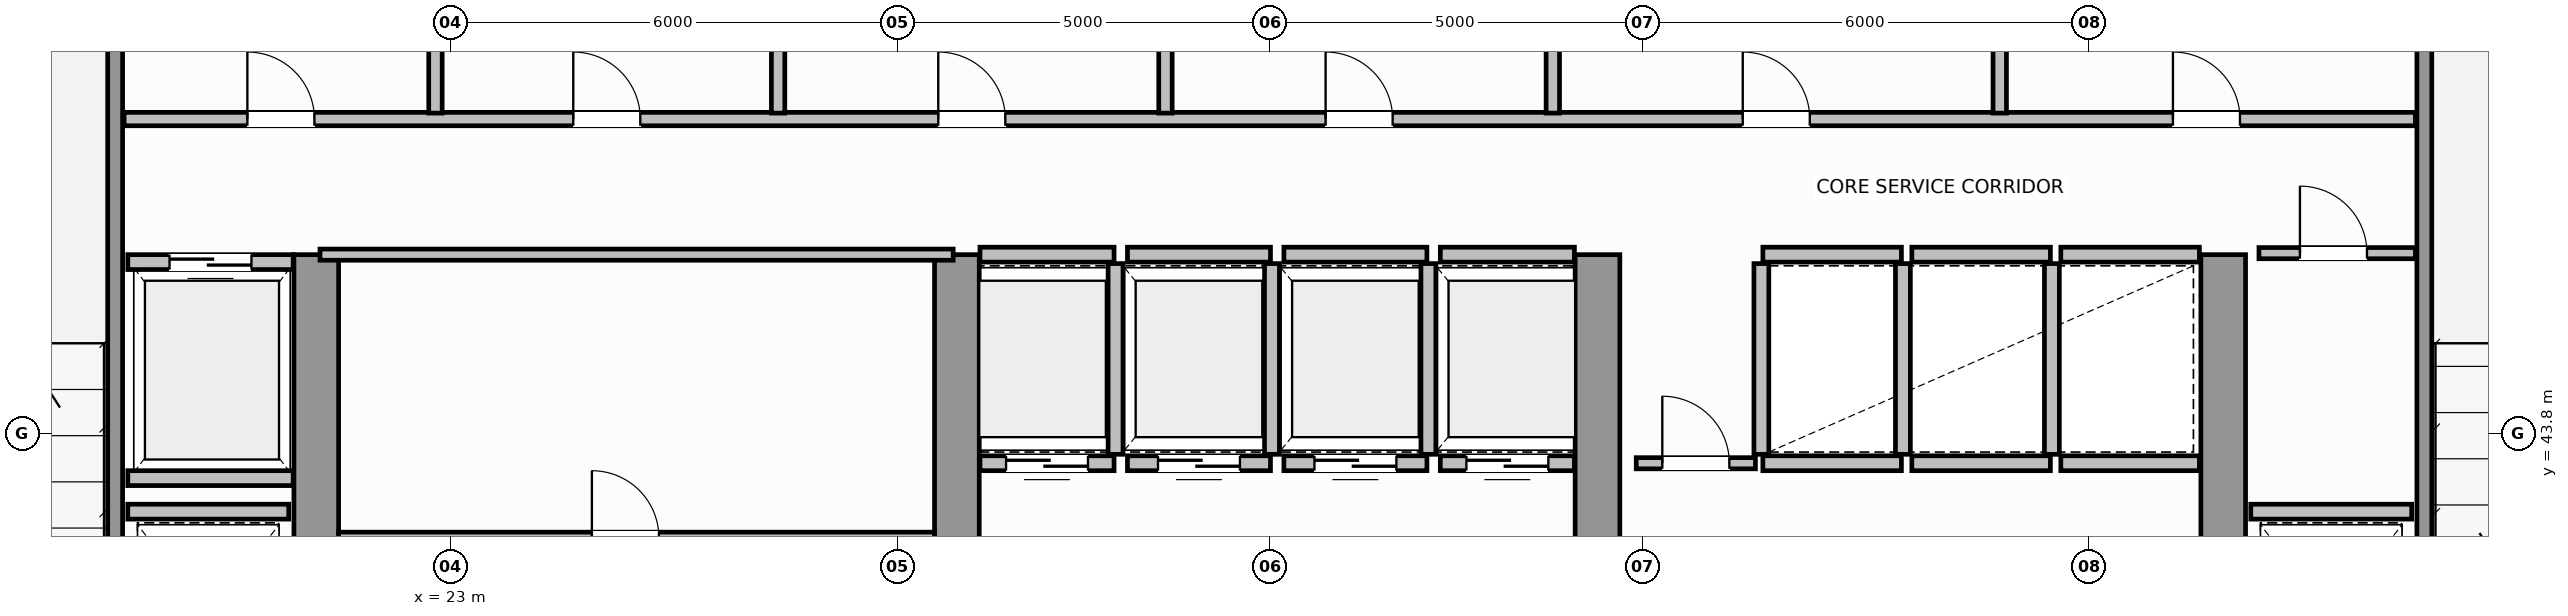
"""IFC4 building model, lengths in metres.
Left out: names, types, materials, properties, quantities, classifications, styles, units other than length and angle.
Written with IfcOpenShell. Run it as: python <this file> out.ifc"""

import sys

from ifc_helpers import new_model, si_unit, direction, frame, frame_2d, origin, place, context, subcontext, project, spatial, rectangle, extrude, source, transform, mapped, element, fill, save


model = new_model("IFC4")
c1 = context("Model", 3, precision=1e-05, world=origin(), true_north=direction((0.0, 1.0)))
c2 = subcontext(c1, "Body", "Model", "MODEL_VIEW")
j1 = project(units=[si_unit("LENGTHUNIT", "METRE"), si_unit("PLANEANGLEUNIT", "RADIAN")], contexts=[c1])
p1 = place(None, origin())
s1 = spatial("IfcSite", under=j1, at=p1, CompositionType="ELEMENT")
p2 = place(p1, origin())
s2 = spatial("IfcBuilding", under=s1, at=p2, CompositionType="ELEMENT")
p3 = place(p2, frame((0.0, 0.0, 188.0)))
s3 = spatial("IfcBuildingStorey", under=s2, at=p3, CompositionType="ELEMENT", Elevation=188.0)
for number, where, z_axis, x_axis in (
    (1, (21.2, 36.82, 0.0), (0.0, 0.0, 1.0), (0.0, 1.0, 0.0)),
    (2, (29.8, 36.82, 0.0), (0.0, 0.0, 1.0), (0.0, 1.0, 0.0)),
    (3, (38.4, 36.82, 0.0), (0.0, 0.0, 1.0), (0.0, 1.0, 0.0)),
    (4, (46.8, 36.82, 0.0), (0.0, 0.0, 1.0), (0.0, 1.0, 0.0)),
):
    element("IfcWall", number, at=place(p3, frame(where, z_axis=z_axis, x_axis=x_axis)), inside=s3, PredefinedType="SHEAR", context=c2, shape_type="SweptSolid", body=[
        extrude(rectangle(XDim=9.38, YDim=0.6, at=frame_2d((4.69, 0.0))), origin(), (0.0, 0.0, 1.0), 3.8),
    ])
for number, where, z_axis, x_axis in (
    (5, (18.5, 39.96, 0.0), (0.0, 0.0, 1.0), (0.0, 1.0, 0.0)),
    (6, (49.5, 39.96, 0.0), (0.0, 0.0, 1.0), (0.0, 1.0, 0.0)),
):
    element("IfcWall", number, at=place(p3, frame(where, z_axis=z_axis, x_axis=x_axis)), inside=s3, PredefinedType="SOLIDWALL", context=c2, shape_type="SweptSolid", body=[
        extrude(rectangle(XDim=9.93, YDim=0.2, at=frame_2d((4.965, 0.0))), origin(), (0.0, 0.0, 1.0), 3.8),
    ])
p4 = place(p3, frame((30.11, 43.4, 0.0), z_axis=(0.0, 0.0, 1.0), x_axis=(1.0, 0.0, 0.0)))
e7 = element("IfcWall", 7, at=p4, inside=s3, PredefinedType="SOLIDWALL", context=c2, shape_type="SweptSolid", body=[
    extrude(rectangle(XDim=1.8, YDim=0.2, at=frame_2d((0.9, 0.0))), origin(), (0.0, 0.0, 1.0), 3.58),
])
p5 = place(p4, frame((0.35, 0.0, 0.0)))
e8 = element("IfcOpeningElement", 8, at=p5, cuts=e7, PredefinedType="OPENING", context=c2, shape_type="SweptSolid", body=[
    extrude(rectangle(XDim=1.1, YDim=2.15, at=frame_2d((0.55, 1.075))), frame((0.0, 0.11, 0.0), z_axis=(0.0, -1.0, 0.0), x_axis=(1.0, 0.0, 0.0)), (0.0, 0.0, 1.0), 0.22),
])
p6 = place(p3, frame((30.11, 46.2, 0.0), z_axis=(0.0, 0.0, 1.0), x_axis=(1.0, 0.0, 0.0)))
e9 = element("IfcWall", 9, at=p6, inside=s3, PredefinedType="SOLIDWALL", context=c2, shape_type="SweptSolid", body=[
    extrude(rectangle(XDim=1.8, YDim=0.2, at=frame_2d((0.9, 0.0))), origin(), (0.0, 0.0, 1.0), 3.58),
])
p7 = place(p3, frame((31.93, 43.52, 0.0), z_axis=(0.0, 0.0, 1.0), x_axis=(0.0, 1.0, 0.0)))
e10 = element("IfcWall", 10, at=p7, inside=s3, PredefinedType="SOLIDWALL", context=c2, shape_type="SweptSolid", body=[
    extrude(rectangle(XDim=2.56, YDim=0.2, at=frame_2d((1.28, 0.0))), origin(), (0.0, 0.0, 1.0), 3.58),
])
p8 = place(p3, frame((32.09, 43.4, 0.0), z_axis=(0.0, 0.0, 1.0), x_axis=(1.0, 0.0, 0.0)))
e11 = element("IfcWall", 11, at=p8, inside=s3, PredefinedType="SOLIDWALL", context=c2, shape_type="SweptSolid", body=[
    extrude(rectangle(XDim=1.92, YDim=0.2, at=frame_2d((0.96, 0.0))), origin(), (0.0, 0.0, 1.0), 3.58),
])
p9 = place(p8, frame((0.41, 0.0, 0.0)))
e12 = element("IfcOpeningElement", 12, at=p9, cuts=e11, PredefinedType="OPENING", context=c2, shape_type="SweptSolid", body=[
    extrude(rectangle(XDim=1.1, YDim=2.15, at=frame_2d((0.55, 1.075))), frame((0.0, 0.11, 0.0), z_axis=(0.0, -1.0, 0.0), x_axis=(1.0, 0.0, 0.0)), (0.0, 0.0, 1.0), 0.22),
])
p10 = place(p3, frame((32.09, 46.2, 0.0), z_axis=(0.0, 0.0, 1.0), x_axis=(1.0, 0.0, 0.0)))
e13 = element("IfcWall", 13, at=p10, inside=s3, PredefinedType="SOLIDWALL", context=c2, shape_type="SweptSolid", body=[
    extrude(rectangle(XDim=1.92, YDim=0.2, at=frame_2d((0.96, 0.0))), origin(), (0.0, 0.0, 1.0), 3.58),
])
p11 = place(p3, frame((34.03, 43.52, 0.0), z_axis=(0.0, 0.0, 1.0), x_axis=(0.0, 1.0, 0.0)))
e14 = element("IfcWall", 14, at=p11, inside=s3, PredefinedType="SOLIDWALL", context=c2, shape_type="SweptSolid", body=[
    extrude(rectangle(XDim=2.56, YDim=0.2, at=frame_2d((1.28, 0.0))), origin(), (0.0, 0.0, 1.0), 3.58),
])
p12 = place(p3, frame((34.19, 43.4, 0.0), z_axis=(0.0, 0.0, 1.0), x_axis=(1.0, 0.0, 0.0)))
e15 = element("IfcWall", 15, at=p12, inside=s3, PredefinedType="SOLIDWALL", context=c2, shape_type="SweptSolid", body=[
    extrude(rectangle(XDim=1.92, YDim=0.2, at=frame_2d((0.96, 0.0))), origin(), (0.0, 0.0, 1.0), 3.58),
])
p13 = place(p12, frame((0.41, 0.0, 0.0)))
e16 = element("IfcOpeningElement", 16, at=p13, cuts=e15, PredefinedType="OPENING", context=c2, shape_type="SweptSolid", body=[
    extrude(rectangle(XDim=1.1, YDim=2.15, at=frame_2d((0.55, 1.075))), frame((0.0, 0.11, 0.0), z_axis=(0.0, -1.0, 0.0), x_axis=(1.0, 0.0, 0.0)), (0.0, 0.0, 1.0), 0.22),
])
p14 = place(p3, frame((34.19, 46.2, 0.0), z_axis=(0.0, 0.0, 1.0), x_axis=(1.0, 0.0, 0.0)))
e17 = element("IfcWall", 17, at=p14, inside=s3, PredefinedType="SOLIDWALL", context=c2, shape_type="SweptSolid", body=[
    extrude(rectangle(XDim=1.92, YDim=0.2, at=frame_2d((0.96, 0.0))), origin(), (0.0, 0.0, 1.0), 3.58),
])
p15 = place(p3, frame((36.13, 43.52, 0.0), z_axis=(0.0, 0.0, 1.0), x_axis=(0.0, 1.0, 0.0)))
e18 = element("IfcWall", 18, at=p15, inside=s3, PredefinedType="SOLIDWALL", context=c2, shape_type="SweptSolid", body=[
    extrude(rectangle(XDim=2.56, YDim=0.2, at=frame_2d((1.28, 0.0))), origin(), (0.0, 0.0, 1.0), 3.58),
])
p16 = place(p3, frame((36.29, 43.4, 0.0), z_axis=(0.0, 0.0, 1.0), x_axis=(1.0, 0.0, 0.0)))
e19 = element("IfcWall", 19, at=p16, inside=s3, PredefinedType="SOLIDWALL", context=c2, shape_type="SweptSolid", body=[
    extrude(rectangle(XDim=1.8, YDim=0.2, at=frame_2d((0.9, 0.0))), origin(), (0.0, 0.0, 1.0), 3.58),
])
p17 = place(p16, frame((0.35, 0.0, 0.0)))
e20 = element("IfcOpeningElement", 20, at=p17, cuts=e19, PredefinedType="OPENING", context=c2, shape_type="SweptSolid", body=[
    extrude(rectangle(XDim=1.1, YDim=2.15, at=frame_2d((0.55, 1.075))), frame((0.0, 0.11, 0.0), z_axis=(0.0, -1.0, 0.0), x_axis=(1.0, 0.0, 0.0)), (0.0, 0.0, 1.0), 0.22),
])
p18 = place(p3, frame((36.29, 46.2, 0.0), z_axis=(0.0, 0.0, 1.0), x_axis=(1.0, 0.0, 0.0)))
e21 = element("IfcWall", 21, at=p18, inside=s3, PredefinedType="SOLIDWALL", context=c2, shape_type="SweptSolid", body=[
    extrude(rectangle(XDim=1.8, YDim=0.2, at=frame_2d((0.9, 0.0))), origin(), (0.0, 0.0, 1.0), 3.58),
])
for number, where, z_axis, x_axis in (
    (22, (40.62, 43.4, 0.0), (0.0, 0.0, 1.0), (1.0, 0.0, 0.0)),
    (23, (40.62, 46.2, 0.0), (0.0, 0.0, 1.0), (1.0, 0.0, 0.0)),
):
    element("IfcWall", number, at=place(p3, frame(where, z_axis=z_axis, x_axis=x_axis)), inside=s3, PredefinedType="SOLIDWALL", context=c2, shape_type="SweptSolid", body=[
        extrude(rectangle(XDim=1.86, YDim=0.2, at=frame_2d((0.93, 0.0))), origin(), (0.0, 0.0, 1.0), 3.58),
    ])
for number, where, z_axis, x_axis in (
    (24, (40.6, 43.52, 0.0), (0.0, 0.0, 1.0), (0.0, 1.0, 0.0)),
    (25, (42.5, 43.52, 0.0), (0.0, 0.0, 1.0), (0.0, 1.0, 0.0)),
):
    element("IfcWall", number, at=place(p3, frame(where, z_axis=z_axis, x_axis=x_axis)), inside=s3, PredefinedType="SOLIDWALL", context=c2, shape_type="SweptSolid", body=[
        extrude(rectangle(XDim=2.56, YDim=0.2, at=frame_2d((1.28, 0.0))), origin(), (0.0, 0.0, 1.0), 3.58),
    ])
for number, where, z_axis, x_axis in (
    (26, (42.62, 43.4, 0.0), (0.0, 0.0, 1.0), (1.0, 0.0, 0.0)),
    (27, (42.62, 46.2, 0.0), (0.0, 0.0, 1.0), (1.0, 0.0, 0.0)),
):
    element("IfcWall", number, at=place(p3, frame(where, z_axis=z_axis, x_axis=x_axis)), inside=s3, PredefinedType="SOLIDWALL", context=c2, shape_type="SweptSolid", body=[
        extrude(rectangle(XDim=1.86, YDim=0.2, at=frame_2d((0.93, 0.0))), origin(), (0.0, 0.0, 1.0), 3.58),
    ])
p19 = place(p3, frame((44.5, 43.52, 0.0), z_axis=(0.0, 0.0, 1.0), x_axis=(0.0, 1.0, 0.0)))
e28 = element("IfcWall", 28, at=p19, inside=s3, PredefinedType="SOLIDWALL", context=c2, shape_type="SweptSolid", body=[
    extrude(rectangle(XDim=2.56, YDim=0.2, at=frame_2d((1.28, 0.0))), origin(), (0.0, 0.0, 1.0), 3.58),
])
for number, where, z_axis, x_axis in (
    (29, (44.62, 43.4, 0.0), (0.0, 0.0, 1.0), (1.0, 0.0, 0.0)),
    (30, (44.62, 46.2, 0.0), (0.0, 0.0, 1.0), (1.0, 0.0, 0.0)),
):
    element("IfcWall", number, at=place(p3, frame(where, z_axis=z_axis, x_axis=x_axis)), inside=s3, PredefinedType="SOLIDWALL", context=c2, shape_type="SweptSolid", body=[
        extrude(rectangle(XDim=1.86, YDim=0.2, at=frame_2d((0.93, 0.0))), origin(), (0.0, 0.0, 1.0), 3.58),
    ])
p20 = place(p3, frame((18.67, 46.1, 0.0), z_axis=(0.0, 0.0, 1.0), x_axis=(1.0, 0.0, 0.0)))
e31 = element("IfcWall", 31, at=p20, inside=s3, PredefinedType="SOLIDWALL", context=c2, shape_type="SweptSolid", body=[
    extrude(rectangle(XDim=2.22, YDim=0.2, at=frame_2d((1.11, 0.0))), origin(), (0.0, 0.0, 1.0), 3.58),
])
p21 = place(p20, frame((0.56, 0.0, 0.0)))
e32 = element("IfcOpeningElement", 32, at=p21, cuts=e31, PredefinedType="OPENING", context=c2, shape_type="SweptSolid", body=[
    extrude(rectangle(XDim=1.1, YDim=2.15, at=frame_2d((0.55, 1.075))), frame((0.0, 0.11, 0.0), z_axis=(0.0, -1.0, 0.0), x_axis=(1.0, 0.0, 0.0)), (0.0, 0.0, 1.0), 0.22),
])
p22 = place(p3, frame((18.67, 43.2, 0.0), z_axis=(0.0, 0.0, 1.0), x_axis=(1.0, 0.0, 0.0)))
e33 = element("IfcWall", 33, at=p22, inside=s3, PredefinedType="SOLIDWALL", context=c2, shape_type="SweptSolid", body=[
    extrude(rectangle(XDim=2.22, YDim=0.2, at=frame_2d((1.11, 0.0))), origin(), (0.0, 0.0, 1.0), 3.58),
])
for number, where, z_axis, x_axis in (
    (34, (18.67, 42.75, 0.0), (0.0, 0.0, 1.0), (1.0, 0.0, 0.0)),
    (35, (47.17, 42.75, 0.0), (0.0, 0.0, 1.0), (1.0, 0.0, 0.0)),
):
    element("IfcWall", number, at=place(p3, frame(where, z_axis=z_axis, x_axis=x_axis)), inside=s3, PredefinedType="SOLIDWALL", context=c2, shape_type="SweptSolid", body=[
        extrude(rectangle(XDim=2.16, YDim=0.2, at=frame_2d((1.08, 0.0))), origin(), (0.0, 0.0, 1.0), 3.58),
    ])
p23 = place(p3, frame((21.25, 46.2, 0.0), z_axis=(0.0, 0.0, 1.0), x_axis=(1.0, 0.0, 0.0)))
e36 = element("IfcWall", 36, at=p23, inside=s3, PredefinedType="PARTITIONING", context=c2, shape_type="SweptSolid", body=[
    extrude(rectangle(XDim=8.5, YDim=0.15, at=frame_2d((4.25, 0.0))), origin(), (0.0, 0.0, 1.0), 3.58),
])
p24 = place(p3, frame((21.5, 42.4, 0.0), z_axis=(0.0, 0.0, 1.0), x_axis=(1.0, 0.0, 0.0)))
e37 = element("IfcWall", 37, at=p24, inside=s3, PredefinedType="PARTITIONING", context=c2, shape_type="SweptSolid", body=[
    extrude(rectangle(XDim=8.0, YDim=0.15, at=frame_2d((4.0, 0.0))), origin(), (0.0, 0.0, 1.0), 3.58),
])
p25 = place(p24, frame((3.4, 0.0, 0.0)))
e38 = element("IfcOpeningElement", 38, at=p25, cuts=e37, PredefinedType="OPENING", context=c2, shape_type="SweptSolid", body=[
    extrude(rectangle(XDim=0.9, YDim=2.1, at=frame_2d((0.45, 1.05))), frame((0.0, 0.085, 0.0), z_axis=(0.0, -1.0, 0.0), x_axis=(1.0, 0.0, 0.0)), (0.0, 0.0, 1.0), 0.17),
])
p26 = place(p3, frame((47.28, 46.22, 0.0), z_axis=(0.0, 0.0, 1.0), x_axis=(1.0, 0.0, 0.0)))
e39 = element("IfcWall", 39, at=p26, inside=s3, PredefinedType="PARTITIONING", context=c2, shape_type="SweptSolid", body=[
    extrude(rectangle(XDim=2.1, YDim=0.15, at=frame_2d((1.05, 0.0))), origin(), (0.0, 0.0, 1.0), 3.58),
])
p27 = place(p26, frame((0.55, 0.0, 0.0)))
e40 = element("IfcOpeningElement", 40, at=p27, cuts=e39, PredefinedType="OPENING", context=c2, shape_type="SweptSolid", body=[
    extrude(rectangle(XDim=0.9, YDim=2.1, at=frame_2d((0.45, 1.05))), frame((0.0, 0.085, 0.0), z_axis=(0.0, -1.0, 0.0), x_axis=(1.0, 0.0, 0.0)), (0.0, 0.0, 1.0), 0.17),
])
p28 = place(p3, frame((38.92, 43.4, 0.0), z_axis=(0.0, 0.0, 1.0), x_axis=(1.0, 0.0, 0.0)))
e41 = element("IfcWall", 41, at=p28, inside=s3, PredefinedType="PARTITIONING", context=c2, shape_type="SweptSolid", body=[
    extrude(rectangle(XDim=1.6, YDim=0.15, at=frame_2d((0.8, 0.0))), origin(), (0.0, 0.0, 1.0), 3.58),
])
p29 = place(p28, frame((0.35, 0.0, 0.0)))
e42 = element("IfcOpeningElement", 42, at=p29, cuts=e41, PredefinedType="OPENING", context=c2, shape_type="SweptSolid", body=[
    extrude(rectangle(XDim=0.9, YDim=2.1, at=frame_2d((0.45, 1.05))), frame((0.0, 0.085, 0.0), z_axis=(0.0, -1.0, 0.0), x_axis=(1.0, 0.0, 0.0)), (0.0, 0.0, 1.0), 0.17),
])
p30 = place(p3, frame((18.62, 48.02, 0.0), z_axis=(0.0, 0.0, 1.0), x_axis=(1.0, 0.0, 0.0)))
e43 = element("IfcWall", 43, at=p30, inside=s3, PredefinedType="PLUMBINGWALL", context=c2, shape_type="SweptSolid", body=[
    extrude(rectangle(XDim=30.76, YDim=0.18, at=frame_2d((15.38, 0.0))), origin(), (0.0, 0.0, 1.0), 3.58),
])
p31 = place(p30, frame((1.655, 0.0, 0.0)))
e44 = element("IfcOpeningElement", 44, at=p31, cuts=e43, PredefinedType="OPENING", context=c2, shape_type="SweptSolid", body=[
    extrude(rectangle(XDim=0.9, YDim=2.15, at=frame_2d((0.45, 1.075))), frame((0.0, 0.1, 0.0), z_axis=(0.0, -1.0, 0.0), x_axis=(1.0, 0.0, 0.0)), (0.0, 0.0, 1.0), 0.2),
])
p32 = place(p30, frame((6.03, 0.0, 0.0)))
e45 = element("IfcOpeningElement", 45, at=p32, cuts=e43, PredefinedType="OPENING", context=c2, shape_type="SweptSolid", body=[
    extrude(rectangle(XDim=0.9, YDim=2.15, at=frame_2d((0.45, 1.075))), frame((0.0, 0.1, 0.0), z_axis=(0.0, -1.0, 0.0), x_axis=(1.0, 0.0, 0.0)), (0.0, 0.0, 1.0), 0.2),
])
p33 = place(p30, frame((10.93, 0.0, 0.0)))
e46 = element("IfcOpeningElement", 46, at=p33, cuts=e43, PredefinedType="OPENING", context=c2, shape_type="SweptSolid", body=[
    extrude(rectangle(XDim=0.9, YDim=2.15, at=frame_2d((0.45, 1.075))), frame((0.0, 0.1, 0.0), z_axis=(0.0, -1.0, 0.0), x_axis=(1.0, 0.0, 0.0)), (0.0, 0.0, 1.0), 0.2),
])
p34 = place(p30, frame((16.13, 0.0, 0.0)))
e47 = element("IfcOpeningElement", 47, at=p34, cuts=e43, PredefinedType="OPENING", context=c2, shape_type="SweptSolid", body=[
    extrude(rectangle(XDim=0.9, YDim=2.15, at=frame_2d((0.45, 1.075))), frame((0.0, 0.1, 0.0), z_axis=(0.0, -1.0, 0.0), x_axis=(1.0, 0.0, 0.0)), (0.0, 0.0, 1.0), 0.2),
])
p35 = place(p30, frame((21.73, 0.0, 0.0)))
e48 = element("IfcOpeningElement", 48, at=p35, cuts=e43, PredefinedType="OPENING", context=c2, shape_type="SweptSolid", body=[
    extrude(rectangle(XDim=0.9, YDim=2.15, at=frame_2d((0.45, 1.075))), frame((0.0, 0.1, 0.0), z_axis=(0.0, -1.0, 0.0), x_axis=(1.0, 0.0, 0.0)), (0.0, 0.0, 1.0), 0.2),
])
p36 = place(p30, frame((27.505, 0.0, 0.0)))
e49 = element("IfcOpeningElement", 49, at=p36, cuts=e43, PredefinedType="OPENING", context=c2, shape_type="SweptSolid", body=[
    extrude(rectangle(XDim=0.9, YDim=2.15, at=frame_2d((0.45, 1.075))), frame((0.0, 0.1, 0.0), z_axis=(0.0, -1.0, 0.0), x_axis=(1.0, 0.0, 0.0)), (0.0, 0.0, 1.0), 0.2),
])
p37 = place(p3, frame((22.8, 48.1, 0.0), z_axis=(0.0, 0.0, 1.0), x_axis=(0.0, 1.0, 0.0)))
e50 = element("IfcWall", 50, at=p37, inside=s3, PredefinedType="PLUMBINGWALL", context=c2, shape_type="SweptSolid", body=[
    extrude(rectangle(XDim=2.28, YDim=0.18, at=frame_2d((1.14, 0.0))), origin(), (0.0, 0.0, 1.0), 2.97),
])
for number, where, z_axis, x_axis in (
    (51, (27.4, 48.1, 0.0), (0.0, 0.0, 1.0), (0.0, 1.0, 0.0)),
    (52, (32.6, 48.1, 0.0), (0.0, 0.0, 1.0), (0.0, 1.0, 0.0)),
    (53, (37.8, 48.1, 0.0), (0.0, 0.0, 1.0), (0.0, 1.0, 0.0)),
    (54, (43.8, 48.1, 0.0), (0.0, 0.0, 1.0), (0.0, 1.0, 0.0)),
):
    element("IfcWall", number, at=place(p3, frame(where, z_axis=z_axis, x_axis=x_axis)), inside=s3, PredefinedType="PLUMBINGWALL", context=c2, shape_type="SweptSolid", body=[
        extrude(rectangle(XDim=2.28, YDim=0.18, at=frame_2d((1.14, 0.0))), origin(), (0.0, 0.0, 1.0), 3.58),
    ])
m1 = source(origin(), c2, "Body", "SweptSolid", [
    extrude(rectangle(XDim=1.1, YDim=2.15, at=frame_2d((0.55, 1.075))), frame((0.0, 0.025, 0.0), z_axis=(0.0, -1.0, 0.0), x_axis=(1.0, 0.0, 0.0)), (0.0, 0.0, 1.0), 0.05),
])
p38 = place(p5, origin())
e55 = element("IfcDoor", 55, at=p38, inside=s3, OperationType="DOUBLE_DOOR_SLIDING", PredefinedType="DOOR", context=c2, shape_type="MappedRepresentation", body=[
    mapped(m1, transform((0.0, 0.0, 0.0), scale=1.0)),
])
fill(e8, e55)
p39 = place(p9, origin())
e56 = element("IfcDoor", 56, at=p39, inside=s3, OperationType="DOUBLE_DOOR_SLIDING", PredefinedType="DOOR", context=c2, shape_type="MappedRepresentation", body=[
    mapped(m1, transform((0.0, 0.0, 0.0), scale=1.0)),
])
fill(e12, e56)
p40 = place(p13, origin())
e57 = element("IfcDoor", 57, at=p40, inside=s3, OperationType="DOUBLE_DOOR_SLIDING", PredefinedType="DOOR", context=c2, shape_type="MappedRepresentation", body=[
    mapped(m1, transform((0.0, 0.0, 0.0), scale=1.0)),
])
fill(e16, e57)
p41 = place(p17, origin())
e58 = element("IfcDoor", 58, at=p41, inside=s3, OperationType="DOUBLE_DOOR_SLIDING", PredefinedType="DOOR", context=c2, shape_type="MappedRepresentation", body=[
    mapped(m1, transform((0.0, 0.0, 0.0), scale=1.0)),
])
fill(e20, e58)
p42 = place(p21, origin())
e59 = element("IfcDoor", 59, at=p42, inside=s3, OperationType="DOUBLE_DOOR_SLIDING", PredefinedType="DOOR", context=c2, shape_type="MappedRepresentation", body=[
    mapped(m1, transform((0.0, 0.0, 0.0), scale=1.0)),
])
fill(e32, e59)
m2 = source(origin(), c2, "Body", "SweptSolid", [
    extrude(rectangle(XDim=0.9, YDim=2.1, at=frame_2d((0.45, 1.05))), frame((0.0, 0.025, 0.0), z_axis=(0.0, -1.0, 0.0), x_axis=(1.0, 0.0, 0.0)), (0.0, 0.0, 1.0), 0.05),
])
p43 = place(p25, origin())
e60 = element("IfcDoor", 60, at=p43, inside=s3, OperationType="SINGLE_SWING_RIGHT", PredefinedType="DOOR", context=c2, shape_type="MappedRepresentation", body=[
    mapped(m2, transform((0.0, 0.0, 0.0), scale=1.0)),
])
fill(e38, e60)
p44 = place(p27, origin())
e61 = element("IfcDoor", 61, at=p44, inside=s3, OperationType="SINGLE_SWING_RIGHT", PredefinedType="DOOR", context=c2, shape_type="MappedRepresentation", body=[
    mapped(m2, transform((0.0, 0.0, 0.0), scale=1.0)),
])
fill(e40, e61)
p45 = place(p29, origin())
e62 = element("IfcDoor", 62, at=p45, inside=s3, OperationType="SINGLE_SWING_LEFT", PredefinedType="DOOR", context=c2, shape_type="MappedRepresentation", body=[
    mapped(m2, transform((0.0, 0.0, 0.0), scale=1.0)),
])
fill(e42, e62)
m3 = source(origin(), c2, "Body", "SweptSolid", [
    extrude(rectangle(XDim=0.9, YDim=2.15, at=frame_2d((0.45, 1.075))), frame((0.0, 0.025, 0.0), z_axis=(0.0, -1.0, 0.0), x_axis=(1.0, 0.0, 0.0)), (0.0, 0.0, 1.0), 0.05),
])
p46 = place(p31, origin())
e63 = element("IfcDoor", 63, at=p46, inside=s3, OperationType="SINGLE_SWING_LEFT", PredefinedType="DOOR", context=c2, shape_type="MappedRepresentation", body=[
    mapped(m3, transform((0.0, 0.0, 0.0), scale=1.0)),
])
fill(e44, e63)
p47 = place(p32, origin())
e64 = element("IfcDoor", 64, at=p47, inside=s3, OperationType="SINGLE_SWING_RIGHT", PredefinedType="DOOR", context=c2, shape_type="MappedRepresentation", body=[
    mapped(m3, transform((0.0, 0.0, 0.0), scale=1.0)),
])
fill(e45, e64)
p48 = place(p33, origin())
e65 = element("IfcDoor", 65, at=p48, inside=s3, OperationType="SINGLE_SWING_LEFT", PredefinedType="DOOR", context=c2, shape_type="MappedRepresentation", body=[
    mapped(m3, transform((0.0, 0.0, 0.0), scale=1.0)),
])
fill(e46, e65)
p49 = place(p34, origin())
e66 = element("IfcDoor", 66, at=p49, inside=s3, OperationType="SINGLE_SWING_RIGHT", PredefinedType="DOOR", context=c2, shape_type="MappedRepresentation", body=[
    mapped(m3, transform((0.0, 0.0, 0.0), scale=1.0)),
])
fill(e47, e66)
p50 = place(p35, origin())
e67 = element("IfcDoor", 67, at=p50, inside=s3, OperationType="SINGLE_SWING_LEFT", PredefinedType="DOOR", context=c2, shape_type="MappedRepresentation", body=[
    mapped(m3, transform((0.0, 0.0, 0.0), scale=1.0)),
])
fill(e48, e67)
p51 = place(p36, origin())
e68 = element("IfcDoor", 68, at=p51, inside=s3, OperationType="SINGLE_SWING_RIGHT", PredefinedType="DOOR", context=c2, shape_type="MappedRepresentation", body=[
    mapped(m3, transform((0.0, 0.0, 0.0), scale=1.0)),
])
fill(e49, e68)
save(model, sys.argv[1])
